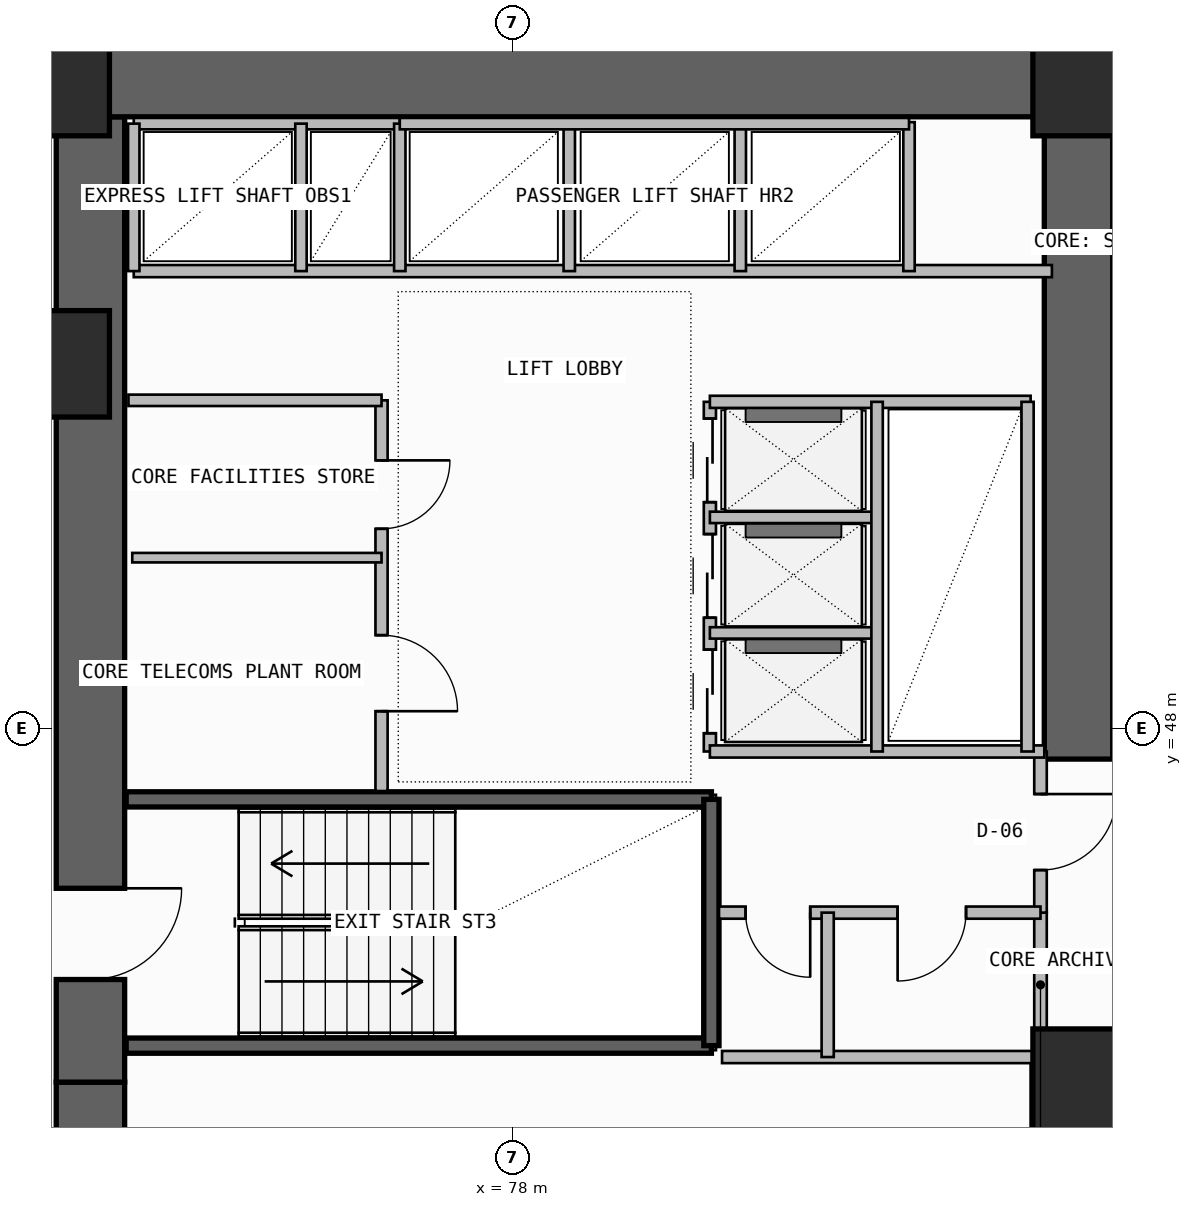
"""IFC4 building model, lengths in metres.
Left out: names, types, materials, properties, quantities, classifications, styles, units other than length and angle.
Written with IfcOpenShell. Run it as: python <this file> out.ifc"""

import sys

from ifc_helpers import new_model, si_unit, direction, frame, frame_2d, origin, origin_2d, place, context, subcontext, project, spatial, rectangle, extrude, element, fill, save


model = new_model("IFC4")
c1 = context("Model", 3, precision=1e-05, world=origin(), true_north=direction((0.0, 1.0)))
c2 = subcontext(c1, "Body", "Model", "MODEL_VIEW")
j1 = project(units=[si_unit("LENGTHUNIT", "METRE"), si_unit("PLANEANGLEUNIT", "RADIAN")], contexts=[c1])
p1 = place(None, origin())
s1 = spatial("IfcSite", under=j1, at=p1, CompositionType="ELEMENT")
p2 = place(p1, origin())
s2 = spatial("IfcBuilding", under=s1, at=p2, CompositionType="ELEMENT")
p3 = place(p2, frame((0.0, 0.0, 106.5)))
s3 = spatial("IfcBuildingStorey", under=s2, at=p3, CompositionType="ELEMENT", Elevation=106.5)
p4 = place(p3, frame((72.45, 35.5, -0.26), z_axis=(0.0, 0.0, 1.0), x_axis=(0.0, 1.0, 0.0)))
e1 = element("IfcWall", 1, at=p4, inside=s3, PredefinedType="SHEAR", context=c2, shape_type="SweptSolid", body=[
    extrude(rectangle(XDim=7.85, YDim=0.9, at=frame_2d((3.925, 0.0))), origin(), (0.0, 0.0, 1.0), 3.6),
])
p5 = place(p4, frame((1.45, 0.0, 0.26)))
e2 = element("IfcOpeningElement", 2, at=p5, cuts=e1, PredefinedType="OPENING", context=c2, shape_type="SweptSolid", body=[
    extrude(rectangle(XDim=1.2, YDim=2.2, at=frame_2d((0.6, 1.1))), frame((0.0, 0.46, 0.0), z_axis=(0.0, -1.0, 0.0), x_axis=(1.0, 0.0, 0.0)), (0.0, 0.0, 1.0), 0.92),
])
p6 = place(p3, frame((72.45, 43.35, -0.26), z_axis=(0.0, 0.0, 1.0), x_axis=(0.0, 1.0, 0.0)))
e3 = element("IfcWall", 3, at=p6, inside=s3, PredefinedType="SHEAR", context=c2, shape_type="SweptSolid", body=[
    extrude(rectangle(XDim=12.7, YDim=0.9, at=frame_2d((6.35, 0.0))), origin(), (0.0, 0.0, 1.0), 3.6),
])
p7 = place(p6, frame((1.35, 0.0, 0.26)))
e4 = element("IfcOpeningElement", 4, at=p7, cuts=e3, PredefinedType="OPENING", context=c2, shape_type="SweptSolid", body=[
    extrude(rectangle(XDim=1.2, YDim=2.2, at=frame_2d((0.6, 1.1))), frame((0.0, 0.46, 0.0), z_axis=(0.0, -1.0, 0.0), x_axis=(1.0, 0.0, 0.0)), (0.0, 0.0, 1.0), 0.92),
])
p8 = place(p3, frame((72.0, 56.5, -0.26), z_axis=(0.0, 0.0, 1.0), x_axis=(1.0, 0.0, 0.0)))
e5 = element("IfcWall", 5, at=p8, inside=s3, PredefinedType="SHEAR", context=c2, shape_type="SweptSolid", body=[
    extrude(rectangle(XDim=13.9, YDim=0.9, at=frame_2d((6.95, 0.0))), origin(), (0.0, 0.0, 1.0), 3.6),
])
p9 = place(p3, frame((85.45, 47.6, -0.26), z_axis=(0.0, 0.0, 1.0), x_axis=(0.0, 1.0, 0.0)))
e6 = element("IfcWall", 6, at=p9, inside=s3, PredefinedType="SHEAR", context=c2, shape_type="SweptSolid", body=[
    extrude(rectangle(XDim=8.45, YDim=0.9, at=frame_2d((4.225, 0.0))), origin(), (0.0, 0.0, 1.0), 3.6),
])
for number, where, z_axis, x_axis in (
    (7, (85.55, 43.35, 0.0), (0.0, 0.0, 1.0), (1.0, 0.0, 0.0)),
    (8, (72.0, 52.8, 0.0), (0.0, 0.0, 1.0), (1.0, 0.0, 0.0)),
    (9, (72.0, 56.5, 0.0), (0.0, 0.0, 1.0), (1.0, 0.0, 0.0)),
    (10, (85.55, 56.5, 0.0), (0.0, 0.0, 1.0), (1.0, 0.0, 0.0)),
):
    element("IfcColumn", number, at=place(p3, frame(where, z_axis=z_axis, x_axis=x_axis)), inside=s3, PredefinedType="COLUMN", context=c2, shape_type="SweptSolid", body=[
        extrude(rectangle(XDim=1.4, YDim=1.4, at=origin_2d()), origin(), (0.0, 0.0, 1.0), 3.6),
    ])
p10 = place(p3, frame((84.92, 38.85, 0.0), z_axis=(0.0, 0.0, 1.0), x_axis=(0.0, 1.0, 0.0)))
e11 = element("IfcWall", 11, at=p10, inside=s3, PredefinedType="SOLIDWALL", context=c2, shape_type="SweptSolid", body=[
    extrude(rectangle(XDim=4.83, YDim=0.2, at=frame_2d((2.415, 0.0))), origin(), (0.0, 0.0, 1.0), 3.34),
])
p11 = place(p10, frame((1.25, 0.0, 0.0)))
e12 = element("IfcOpeningElement", 12, at=p11, cuts=e11, PredefinedType="OPENING", context=c2, shape_type="SweptSolid", body=[
    extrude(rectangle(XDim=1.1, YDim=2.2, at=frame_2d((0.55, 1.1))), frame((0.0, 0.11, 0.0), z_axis=(0.0, -1.0, 0.0), x_axis=(1.0, 0.0, 0.0)), (0.0, 0.0, 1.0), 0.22),
])
for number, where, z_axis, x_axis in (
    (13, (72.92, 43.83, -0.26), (0.0, 0.0, 1.0), (1.0, 0.0, 0.0)),
    (14, (72.92, 47.07, -0.26), (0.0, 0.0, 1.0), (1.0, 0.0, 0.0)),
):
    element("IfcWall", number, at=place(p3, frame(where, z_axis=z_axis, x_axis=x_axis)), inside=s3, PredefinedType="SOLIDWALL", context=c2, shape_type="SweptSolid", body=[
        extrude(rectangle(XDim=7.7, YDim=0.2, at=frame_2d((3.85, 0.0))), origin(), (0.0, 0.0, 1.0), 3.6),
    ])
p12 = place(p3, frame((80.62, 43.83, -0.26), z_axis=(0.0, 0.0, 1.0), x_axis=(0.0, 1.0, 0.0)))
e15 = element("IfcWall", 15, at=p12, inside=s3, PredefinedType="SOLIDWALL", context=c2, shape_type="SweptSolid", body=[
    extrude(rectangle(XDim=3.24, YDim=0.2, at=frame_2d((1.62, 0.0))), origin(), (0.0, 0.0, 1.0), 3.6),
])
p13 = place(p3, frame((84.95, 43.68, 0.0), z_axis=(0.0, 0.0, 1.0), x_axis=(0.0, 1.0, 0.0)))
e16 = element("IfcWall", 16, at=p13, inside=s3, PredefinedType="PLUMBINGWALL", context=c2, shape_type="SweptSolid", body=[
    extrude(rectangle(XDim=1.9, YDim=0.165, at=frame_2d((0.95, 0.0))), origin(), (0.0, 0.0, 1.0), 3.34),
])
p14 = place(p3, frame((84.95, 45.58, 0.0), z_axis=(0.0, 0.0, 1.0), x_axis=(0.0, 1.0, 0.0)))
e17 = element("IfcWall", 17, at=p14, inside=s3, PredefinedType="PARTITIONING", context=c2, shape_type="SweptSolid", body=[
    extrude(rectangle(XDim=2.12, YDim=0.165, at=frame_2d((1.06, 0.0))), origin(), (0.0, 0.0, 1.0), 3.34),
])
p15 = place(p14, frame((0.56, 0.0, 0.0)))
e18 = element("IfcOpeningElement", 18, at=p15, cuts=e17, PredefinedType="OPENING", context=c2, shape_type="SweptSolid", body=[
    extrude(rectangle(XDim=1.0, YDim=2.2, at=frame_2d((0.5, 1.1))), frame((0.0, 0.093, 0.0), z_axis=(0.0, -1.0, 0.0), x_axis=(1.0, 0.0, 0.0)), (0.0, 0.0, 1.0), 0.185),
])
p16 = place(p3, frame((80.72, 45.58, 0.0), z_axis=(0.0, 0.0, 1.0), x_axis=(1.0, 0.0, 0.0)))
e19 = element("IfcWall", 19, at=p16, inside=s3, PredefinedType="PLUMBINGWALL", context=c2, shape_type="SweptSolid", body=[
    extrude(rectangle(XDim=4.23, YDim=0.16, at=frame_2d((2.115, 0.0))), origin(), (0.0, 0.0, 1.0), 3.34),
])
p17 = place(p16, frame((0.35, 0.0, 0.0)))
e20 = element("IfcOpeningElement", 20, at=p17, cuts=e19, PredefinedType="OPENING", context=c2, shape_type="SweptSolid", body=[
    extrude(rectangle(XDim=0.85, YDim=2.05, at=frame_2d((0.425, 1.025))), frame((0.0, 0.09, 0.0), z_axis=(0.0, -1.0, 0.0), x_axis=(1.0, 0.0, 0.0)), (0.0, 0.0, 1.0), 0.18),
])
p18 = place(p16, frame((2.35, 0.0, 0.0)))
e21 = element("IfcOpeningElement", 21, at=p18, cuts=e19, PredefinedType="OPENING", context=c2, shape_type="SweptSolid", body=[
    extrude(rectangle(XDim=0.9, YDim=2.1, at=frame_2d((0.45, 1.05))), frame((0.0, 0.09, 0.0), z_axis=(0.0, -1.0, 0.0), x_axis=(1.0, 0.0, 0.0)), (0.0, 0.0, 1.0), 0.18),
])
p19 = place(p3, frame((80.76, 43.68, 0.0), z_axis=(0.0, 0.0, 1.0), x_axis=(1.0, 0.0, 0.0)))
e22 = element("IfcWall", 22, at=p19, inside=s3, PredefinedType="PLUMBINGWALL", context=c2, shape_type="SweptSolid", body=[
    extrude(rectangle(XDim=4.19, YDim=0.16, at=frame_2d((2.095, 0.0))), origin(), (0.0, 0.0, 1.0), 3.34),
])
p20 = place(p3, frame((82.15, 43.68, 0.0), z_axis=(0.0, 0.0, 1.0), x_axis=(0.0, 1.0, 0.0)))
e23 = element("IfcWall", 23, at=p20, inside=s3, PredefinedType="PLUMBINGWALL", context=c2, shape_type="SweptSolid", body=[
    extrude(rectangle(XDim=1.9, YDim=0.16, at=frame_2d((0.95, 0.0))), origin(), (0.0, 0.0, 1.0), 3.34),
])
p21 = place(p3, frame((76.28, 47.18, 0.0), z_axis=(0.0, 0.0, 1.0), x_axis=(0.0, 1.0, 0.0)))
e24 = element("IfcWall", 24, at=p21, inside=s3, PredefinedType="SOLIDWALL", context=c2, shape_type="SweptSolid", body=[
    extrude(rectangle(XDim=5.14, YDim=0.16, at=frame_2d((2.57, 0.0))), origin(), (0.0, 0.0, 1.0), 3.34),
])
p22 = place(p21, frame((1.05, 0.0, 0.0)))
e25 = element("IfcOpeningElement", 25, at=p22, cuts=e24, PredefinedType="OPENING", context=c2, shape_type="SweptSolid", body=[
    extrude(rectangle(XDim=1.0, YDim=2.2, at=frame_2d((0.5, 1.1))), frame((0.0, 0.09, 0.0), z_axis=(0.0, -1.0, 0.0), x_axis=(1.0, 0.0, 0.0)), (0.0, 0.0, 1.0), 0.18),
])
p23 = place(p21, frame((3.45, 0.0, 0.0)))
e26 = element("IfcOpeningElement", 26, at=p23, cuts=e24, PredefinedType="OPENING", context=c2, shape_type="SweptSolid", body=[
    extrude(rectangle(XDim=0.9, YDim=2.1, at=frame_2d((0.45, 1.05))), frame((0.0, 0.09, 0.0), z_axis=(0.0, -1.0, 0.0), x_axis=(1.0, 0.0, 0.0)), (0.0, 0.0, 1.0), 0.18),
])
p24 = place(p3, frame((72.95, 52.32, 0.0), z_axis=(0.0, 0.0, 1.0), x_axis=(1.0, 0.0, 0.0)))
e27 = element("IfcWall", 27, at=p24, inside=s3, PredefinedType="SOLIDWALL", context=c2, shape_type="SweptSolid", body=[
    extrude(rectangle(XDim=3.33, YDim=0.15, at=frame_2d((1.665, 0.0))), origin(), (0.0, 0.0, 1.0), 3.34),
])
p25 = place(p3, frame((73.0, 50.25, 0.0), z_axis=(0.0, 0.0, 1.0), x_axis=(1.0, 0.0, 0.0)))
e28 = element("IfcWall", 28, at=p25, inside=s3, PredefinedType="PARTITIONING", context=c2, shape_type="SweptSolid", body=[
    extrude(rectangle(XDim=3.28, YDim=0.125, at=frame_2d((1.64, 0.0))), origin(), (0.0, 0.0, 1.0), 3.34),
])
p26 = place(p3, frame((80.6, 47.7, 0.0), z_axis=(0.0, 0.0, 1.0), x_axis=(0.0, 1.0, 0.0)))
e29 = element("IfcWall", 29, at=p26, inside=s3, PredefinedType="SOLIDWALL", context=c2, shape_type="SweptSolid", body=[
    extrude(rectangle(XDim=4.6, YDim=0.16, at=frame_2d((2.3, 0.0))), origin(), (0.0, 0.0, 1.0), 3.34),
])
p27 = place(p26, frame((0.24, 0.0, 0.0)))
e30 = element("IfcOpeningElement", 30, at=p27, cuts=e29, PredefinedType="OPENING", context=c2, shape_type="SweptSolid", body=[
    extrude(rectangle(XDim=1.1, YDim=2.25, at=frame_2d((0.55, 1.125))), frame((0.0, 0.09, 0.0), z_axis=(0.0, -1.0, 0.0), x_axis=(1.0, 0.0, 0.0)), (0.0, 0.0, 1.0), 0.18),
])
p28 = place(p26, frame((1.76, 0.0, 0.0)))
e31 = element("IfcOpeningElement", 31, at=p28, cuts=e29, PredefinedType="OPENING", context=c2, shape_type="SweptSolid", body=[
    extrude(rectangle(XDim=1.1, YDim=2.25, at=frame_2d((0.55, 1.125))), frame((0.0, 0.09, 0.0), z_axis=(0.0, -1.0, 0.0), x_axis=(1.0, 0.0, 0.0)), (0.0, 0.0, 1.0), 0.18),
])
p29 = place(p26, frame((3.28, 0.0, 0.0)))
e32 = element("IfcOpeningElement", 32, at=p29, cuts=e29, PredefinedType="OPENING", context=c2, shape_type="SweptSolid", body=[
    extrude(rectangle(XDim=1.1, YDim=2.25, at=frame_2d((0.55, 1.125))), frame((0.0, 0.09, 0.0), z_axis=(0.0, -1.0, 0.0), x_axis=(1.0, 0.0, 0.0)), (0.0, 0.0, 1.0), 0.18),
])
p30 = place(p3, frame((80.6, 47.7, 0.0), z_axis=(0.0, 0.0, 1.0), x_axis=(1.0, 0.0, 0.0)))
e33 = element("IfcWall", 33, at=p30, inside=s3, PredefinedType="SOLIDWALL", context=c2, shape_type="SweptSolid", body=[
    extrude(rectangle(XDim=4.4, YDim=0.16, at=frame_2d((2.2, 0.0))), origin(), (0.0, 0.0, 1.0), 3.34),
])
p31 = place(p3, frame((80.6, 52.3, 0.0), z_axis=(0.0, 0.0, 1.0), x_axis=(1.0, 0.0, 0.0)))
e34 = element("IfcWall", 34, at=p31, inside=s3, PredefinedType="SOLIDWALL", context=c2, shape_type="SweptSolid", body=[
    extrude(rectangle(XDim=4.22, YDim=0.16, at=frame_2d((2.11, 0.0))), origin(), (0.0, 0.0, 1.0), 3.34),
])
for number, where, z_axis, x_axis in (
    (35, (80.6, 49.26, 0.0), (0.0, 0.0, 1.0), (1.0, 0.0, 0.0)),
    (36, (80.6, 50.78, 0.0), (0.0, 0.0, 1.0), (1.0, 0.0, 0.0)),
):
    element("IfcWall", number, at=place(p3, frame(where, z_axis=z_axis, x_axis=x_axis)), inside=s3, PredefinedType="PLUMBINGWALL", context=c2, shape_type="SweptSolid", body=[
        extrude(rectangle(XDim=2.2, YDim=0.15, at=frame_2d((1.1, 0.0))), origin(), (0.0, 0.0, 1.0), 3.34),
    ])
p32 = place(p3, frame((82.8, 47.7, 0.0), z_axis=(0.0, 0.0, 1.0), x_axis=(0.0, 1.0, 0.0)))
e37 = element("IfcWall", 37, at=p32, inside=s3, PredefinedType="PLUMBINGWALL", context=c2, shape_type="SweptSolid", body=[
    extrude(rectangle(XDim=4.6, YDim=0.15, at=frame_2d((2.3, 0.0))), origin(), (0.0, 0.0, 1.0), 3.34),
])
p33 = place(p3, frame((84.78, 47.7, 0.0), z_axis=(0.0, 0.0, 1.0), x_axis=(0.0, 1.0, 0.0)))
e38 = element("IfcWall", 38, at=p33, inside=s3, PredefinedType="SOLIDWALL", context=c2, shape_type="SweptSolid", body=[
    extrude(rectangle(XDim=4.6, YDim=0.16, at=frame_2d((2.3, 0.0))), origin(), (0.0, 0.0, 1.0), 3.34),
])
p34 = place(p3, frame((73.02, 54.02, 0.0), z_axis=(0.0, 0.0, 1.0), x_axis=(1.0, 0.0, 0.0)))
e39 = element("IfcWall", 39, at=p34, inside=s3, PredefinedType="SOLIDWALL", context=c2, shape_type="SweptSolid", body=[
    extrude(rectangle(XDim=12.08, YDim=0.16, at=frame_2d((6.04, 0.0))), origin(), (0.0, 0.0, 1.0), 3.34),
])
p35 = place(p3, frame((73.02, 55.96, 0.0), z_axis=(0.0, 0.0, 1.0), x_axis=(1.0, 0.0, 0.0)))
e40 = element("IfcWall", 40, at=p35, inside=s3, PredefinedType="SOLIDWALL", context=c2, shape_type="SweptSolid", body=[
    extrude(rectangle(XDim=3.5, YDim=0.15, at=frame_2d((1.75, 0.0))), origin(), (0.0, 0.0, 1.0), 3.34),
])
p36 = place(p3, frame((73.02, 54.02, 0.0), z_axis=(0.0, 0.0, 1.0), x_axis=(0.0, 1.0, 0.0)))
e41 = element("IfcWall", 41, at=p36, inside=s3, PredefinedType="PLUMBINGWALL", context=c2, shape_type="SweptSolid", body=[
    extrude(rectangle(XDim=1.94, YDim=0.15, at=frame_2d((0.97, 0.0))), origin(), (0.0, 0.0, 1.0), 3.34),
])
p37 = place(p3, frame((76.52, 54.02, 0.0), z_axis=(0.0, 0.0, 1.0), x_axis=(0.0, 1.0, 0.0)))
e42 = element("IfcWall", 42, at=p37, inside=s3, PredefinedType="SOLIDWALL", context=c2, shape_type="SweptSolid", body=[
    extrude(rectangle(XDim=1.94, YDim=0.15, at=frame_2d((0.97, 0.0))), origin(), (0.0, 0.0, 1.0), 3.34),
])
p38 = place(p3, frame((75.22, 54.02, 0.0), z_axis=(0.0, 0.0, 1.0), x_axis=(0.0, 1.0, 0.0)))
e43 = element("IfcWall", 43, at=p38, inside=s3, PredefinedType="PLUMBINGWALL", context=c2, shape_type="SweptSolid", body=[
    extrude(rectangle(XDim=1.94, YDim=0.15, at=frame_2d((0.97, 0.0))), origin(), (0.0, 0.0, 1.0), 3.34),
])
for number, where, z_axis, x_axis in (
    (44, (78.75, 54.02, 0.0), (0.0, 0.0, 1.0), (0.0, 1.0, 0.0)),
    (45, (81.0, 54.02, 0.0), (0.0, 0.0, 1.0), (0.0, 1.0, 0.0)),
):
    element("IfcWall", number, at=place(p3, frame(where, z_axis=z_axis, x_axis=x_axis)), inside=s3, PredefinedType="PLUMBINGWALL", context=c2, shape_type="SweptSolid", body=[
        extrude(rectangle(XDim=1.96, YDim=0.15, at=frame_2d((0.98, 0.0))), origin(), (0.0, 0.0, 1.0), 3.34),
    ])
p39 = place(p3, frame((83.22, 54.02, 0.0), z_axis=(0.0, 0.0, 1.0), x_axis=(0.0, 1.0, 0.0)))
e46 = element("IfcWall", 46, at=p39, inside=s3, PredefinedType="SOLIDWALL", context=c2, shape_type="SweptSolid", body=[
    extrude(rectangle(XDim=1.96, YDim=0.15, at=frame_2d((0.98, 0.0))), origin(), (0.0, 0.0, 1.0), 3.34),
])
p40 = place(p3, frame((76.52, 55.96, 0.0), z_axis=(0.0, 0.0, 1.0), x_axis=(1.0, 0.0, 0.0)))
e47 = element("IfcWall", 47, at=p40, inside=s3, PredefinedType="SOLIDWALL", context=c2, shape_type="SweptSolid", body=[
    extrude(rectangle(XDim=6.7, YDim=0.15, at=frame_2d((3.35, 0.0))), origin(), (0.0, 0.0, 1.0), 3.34),
])
p41 = place(p7, frame((1.2, 0.0, 0.0), z_axis=(0.0, 0.0, 1.0), x_axis=(-1.0, 0.0, 0.0)))
e48 = element("IfcDoor", 48, at=p41, inside=s3, OperationType="SINGLE_SWING_LEFT", PredefinedType="USERDEFINED", context=c2, shape_type="SweptSolid", body=[
    extrude(rectangle(XDim=1.2, YDim=2.2, at=frame_2d((0.6, 1.1))), frame((0.0, 0.025, 0.0), z_axis=(0.0, -1.0, 0.0), x_axis=(1.0, 0.0, 0.0)), (0.0, 0.0, 1.0), 0.05),
])
fill(e4, e48)
p42 = place(p15, frame((1.0, 0.0, 0.0), z_axis=(0.0, 0.0, 1.0), x_axis=(-1.0, 0.0, 0.0)))
e49 = element("IfcDoor", 49, at=p42, inside=s3, OperationType="SINGLE_SWING_LEFT", PredefinedType="DOOR", context=c2, shape_type="SweptSolid", body=[
    extrude(rectangle(XDim=1.0, YDim=2.2, at=frame_2d((0.5, 1.1))), frame((0.0, 0.025, 0.0), z_axis=(0.0, -1.0, 0.0), x_axis=(1.0, 0.0, 0.0)), (0.0, 0.0, 1.0), 0.05),
])
fill(e18, e49)
p43 = place(p17, frame((0.85, 0.0, 0.0), z_axis=(0.0, 0.0, 1.0), x_axis=(-1.0, 0.0, 0.0)))
e50 = element("IfcDoor", 50, at=p43, inside=s3, OperationType="SINGLE_SWING_LEFT", PredefinedType="DOOR", context=c2, shape_type="SweptSolid", body=[
    extrude(rectangle(XDim=0.85, YDim=2.05, at=frame_2d((0.425, 1.025))), frame((0.0, 0.025, 0.0), z_axis=(0.0, -1.0, 0.0), x_axis=(1.0, 0.0, 0.0)), (0.0, 0.0, 1.0), 0.05),
])
fill(e20, e50)
p44 = place(p18, frame((0.9, 0.0, 0.0), z_axis=(0.0, 0.0, 1.0), x_axis=(-1.0, 0.0, 0.0)))
e51 = element("IfcDoor", 51, at=p44, inside=s3, OperationType="SINGLE_SWING_RIGHT", PredefinedType="DOOR", context=c2, shape_type="SweptSolid", body=[
    extrude(rectangle(XDim=0.9, YDim=2.1, at=frame_2d((0.45, 1.05))), frame((0.0, 0.025, 0.0), z_axis=(0.0, -1.0, 0.0), x_axis=(1.0, 0.0, 0.0)), (0.0, 0.0, 1.0), 0.05),
])
fill(e21, e51)
p45 = place(p22, frame((1.0, 0.0, 0.0), z_axis=(0.0, 0.0, 1.0), x_axis=(-1.0, 0.0, 0.0)))
e52 = element("IfcDoor", 52, at=p45, inside=s3, OperationType="SINGLE_SWING_RIGHT", PredefinedType="DOOR", context=c2, shape_type="SweptSolid", body=[
    extrude(rectangle(XDim=1.0, YDim=2.2, at=frame_2d((0.5, 1.1))), frame((0.0, 0.025, 0.0), z_axis=(0.0, -1.0, 0.0), x_axis=(1.0, 0.0, 0.0)), (0.0, 0.0, 1.0), 0.05),
])
fill(e25, e52)
p46 = place(p23, frame((0.9, 0.0, 0.0), z_axis=(0.0, 0.0, 1.0), x_axis=(-1.0, 0.0, 0.0)))
e53 = element("IfcDoor", 53, at=p46, inside=s3, OperationType="SINGLE_SWING_LEFT", PredefinedType="DOOR", context=c2, shape_type="SweptSolid", body=[
    extrude(rectangle(XDim=0.9, YDim=2.1, at=frame_2d((0.45, 1.05))), frame((0.0, 0.025, 0.0), z_axis=(0.0, -1.0, 0.0), x_axis=(1.0, 0.0, 0.0)), (0.0, 0.0, 1.0), 0.05),
])
fill(e26, e53)
p47 = place(p27, frame((1.1, 0.0, 0.0), z_axis=(0.0, 0.0, 1.0), x_axis=(-1.0, 0.0, 0.0)))
e54 = element("IfcDoor", 54, at=p47, inside=s3, OperationType="DOUBLE_DOOR_SLIDING", PredefinedType="DOOR", context=c2, shape_type="SweptSolid", body=[
    extrude(rectangle(XDim=1.1, YDim=2.25, at=frame_2d((0.55, 1.125))), frame((0.0, 0.025, 0.0), z_axis=(0.0, -1.0, 0.0), x_axis=(1.0, 0.0, 0.0)), (0.0, 0.0, 1.0), 0.05),
])
fill(e30, e54)
p48 = place(p28, frame((1.1, 0.0, 0.0), z_axis=(0.0, 0.0, 1.0), x_axis=(-1.0, 0.0, 0.0)))
e55 = element("IfcDoor", 55, at=p48, inside=s3, OperationType="DOUBLE_DOOR_SLIDING", PredefinedType="DOOR", context=c2, shape_type="SweptSolid", body=[
    extrude(rectangle(XDim=1.1, YDim=2.25, at=frame_2d((0.55, 1.125))), frame((0.0, 0.025, 0.0), z_axis=(0.0, -1.0, 0.0), x_axis=(1.0, 0.0, 0.0)), (0.0, 0.0, 1.0), 0.05),
])
fill(e31, e55)
p49 = place(p29, frame((1.1, 0.0, 0.0), z_axis=(0.0, 0.0, 1.0), x_axis=(-1.0, 0.0, 0.0)))
e56 = element("IfcDoor", 56, at=p49, inside=s3, OperationType="DOUBLE_DOOR_SLIDING", PredefinedType="DOOR", context=c2, shape_type="SweptSolid", body=[
    extrude(rectangle(XDim=1.1, YDim=2.25, at=frame_2d((0.55, 1.125))), frame((0.0, 0.025, 0.0), z_axis=(0.0, -1.0, 0.0), x_axis=(1.0, 0.0, 0.0)), (0.0, 0.0, 1.0), 0.05),
])
fill(e32, e56)
save(model, sys.argv[1])
